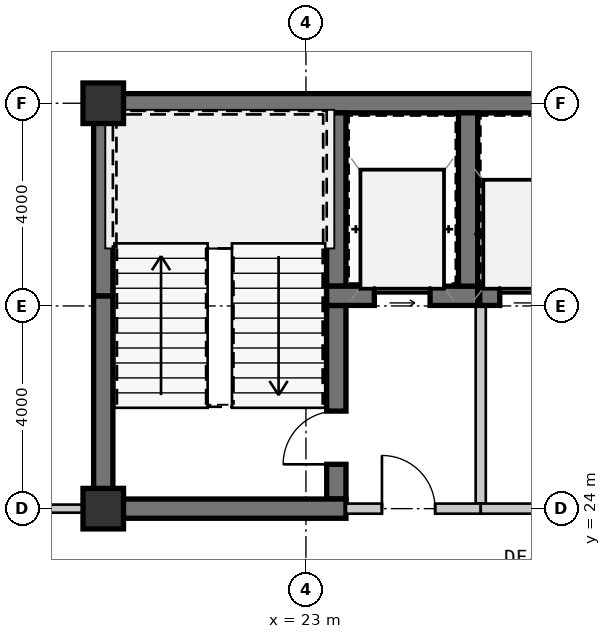
"""IFC4 building model, lengths in metres.
Left out: names, types, materials, properties, quantities, classifications, styles, units other than length and angle.
Written with IfcOpenShell. Run it as: python <this file> out.ifc"""

import sys

from ifc_helpers import new_model, si_unit, direction, frame, frame_2d, origin, origin_2d, place, context, subcontext, project, spatial, rectangle, extrude, source, transform, mapped, element, fill, save


model = new_model("IFC4")
c1 = context("Model", 3, precision=1e-05, world=origin(), true_north=direction((0.0, 1.0)))
c2 = subcontext(c1, "Body", "Model", "MODEL_VIEW")
j1 = project(units=[si_unit("LENGTHUNIT", "METRE"), si_unit("PLANEANGLEUNIT", "RADIAN")], contexts=[c1])
p1 = place(None, origin())
s1 = spatial("IfcSite", under=j1, at=p1, CompositionType="ELEMENT")
p2 = place(p1, origin())
s2 = spatial("IfcBuilding", under=s1, at=p2, CompositionType="ELEMENT")
p3 = place(p2, frame((0.0, 0.0, 32.55)))
s3 = spatial("IfcBuildingStorey", under=s2, at=p3, CompositionType="ELEMENT", Elevation=32.55)
m1 = source(origin(), c2, "Body", "SweptSolid", [
    extrude(rectangle(XDim=0.8, YDim=0.8, at=origin_2d()), origin(), (0.0, 0.0, 1.0), 3.15),
])
for number, where, z_axis, x_axis in (
    (1, (19.0, 24.0, 0.0), (0.0, 0.0, 1.0), (1.0, 0.0, 0.0)),
    (2, (19.0, 32.0, 0.0), (0.0, 0.0, 1.0), (1.0, 0.0, 0.0)),
):
    element("IfcColumn", number, at=place(p3, frame(where, z_axis=z_axis, x_axis=x_axis)), inside=s3, PredefinedType="COLUMN", context=c2, shape_type="MappedRepresentation", body=[
        mapped(m1, transform((0.0, 0.0, 0.0), scale=1.0)),
    ])
m2 = source(origin(), c2, "Body", "SweptSolid", [
    extrude(rectangle(XDim=9.19, YDim=0.38, at=frame_2d((4.595, 0.0))), origin(), (0.0, 0.0, 1.0), 2.93),
])
p4 = place(p3, frame((18.81, 32.0, 0.0), z_axis=(0.0, 0.0, 1.0), x_axis=(1.0, 0.0, 0.0)))
e3 = element("IfcWall", 3, at=p4, inside=s3, PredefinedType="SHEAR", context=c2, shape_type="MappedRepresentation", body=[
    mapped(m2, transform((0.0, 0.0, 0.0), scale=1.0)),
])
m3 = source(origin(), c2, "Body", "SweptSolid", [
    extrude(rectangle(XDim=4.01, YDim=0.38, at=frame_2d((2.005, 0.0))), origin(), (0.0, 0.0, 1.0), 2.93),
])
p5 = place(p3, frame((19.0, 24.19, 0.0), z_axis=(0.0, 0.0, 1.0), x_axis=(0.0, 1.0, 0.0)))
e4 = element("IfcWall", 4, at=p5, inside=s3, PredefinedType="SHEAR", context=c2, shape_type="MappedRepresentation", body=[
    mapped(m3, transform((0.0, 0.0, 0.0), scale=1.0)),
])
m4 = source(origin(), c2, "Body", "SweptSolid", [
    extrude(rectangle(XDim=3.61, YDim=0.38, at=frame_2d((1.805, 0.0))), origin(), (0.0, 0.0, 1.0), 2.93),
])
p6 = place(p3, frame((19.0, 28.2, 0.0), z_axis=(0.0, 0.0, 1.0), x_axis=(0.0, 1.0, 0.0)))
e5 = element("IfcWall", 5, at=p6, inside=s3, PredefinedType="SHEAR", context=c2, shape_type="MappedRepresentation", body=[
    mapped(m4, transform((0.0, 0.0, 0.0), scale=1.0)),
])
m5 = source(origin(), c2, "Body", "SweptSolid", [
    extrude(rectangle(XDim=3.42, YDim=0.38, at=frame_2d((1.71, 0.0))), origin(), (0.0, 0.0, 1.0), 2.93),
])
p7 = place(p3, frame((23.6, 28.39, 0.0), z_axis=(0.0, 0.0, 1.0), x_axis=(0.0, 1.0, 0.0)))
e6 = element("IfcWall", 6, at=p7, inside=s3, PredefinedType="SHEAR", context=c2, shape_type="MappedRepresentation", body=[
    mapped(m5, transform((0.0, 0.0, 0.0), scale=1.0)),
])
m6 = source(origin(), c2, "Body", "SweptSolid", [
    extrude(rectangle(XDim=3.82, YDim=0.38, at=frame_2d((1.91, 0.0))), origin(), (0.0, 0.0, 1.0), 2.93),
])
p8 = place(p3, frame((23.6, 24.19, 0.0), z_axis=(0.0, 0.0, 1.0), x_axis=(0.0, 1.0, 0.0)))
e7 = element("IfcWall", 7, at=p8, inside=s3, PredefinedType="SHEAR", context=c2, shape_type="MappedRepresentation", body=[
    mapped(m6, transform((0.0, 0.0, 0.0), scale=1.0)),
])
m7 = source(origin(), c2, "Body", "SweptSolid", [
    extrude(rectangle(XDim=1.05, YDim=2.1, at=frame_2d((0.525, 1.05))), frame((0.0, 0.2, 0.0), z_axis=(0.0, -1.0, 0.0), x_axis=(1.0, 0.0, 0.0)), (0.0, 0.0, 1.0), 0.4),
])
p9 = place(p8, frame((0.685, 0.0, 0.0)))
e8 = element("IfcOpeningElement", 8, at=p9, cuts=e7, PredefinedType="OPENING", context=c2, shape_type="MappedRepresentation", body=[
    mapped(m7, transform((0.0, 0.0, 0.0), scale=1.0)),
])
m8 = source(origin(), c2, "Body", "SweptSolid", [
    extrude(rectangle(XDim=4.98, YDim=0.38, at=frame_2d((2.49, 0.0))), origin(), (0.0, 0.0, 1.0), 2.93),
])
p10 = place(p3, frame((18.81, 24.0, 0.0), z_axis=(0.0, 0.0, 1.0), x_axis=(1.0, 0.0, 0.0)))
e9 = element("IfcWall", 9, at=p10, inside=s3, PredefinedType="SHEAR", context=c2, shape_type="MappedRepresentation", body=[
    mapped(m8, transform((0.0, 0.0, 0.0), scale=1.0)),
])
m9 = source(origin(), c2, "Body", "SweptSolid", [
    extrude(rectangle(XDim=2.98, YDim=0.38, at=frame_2d((1.49, 0.0))), origin(), (0.0, 0.0, 1.0), 2.93),
])
p11 = place(p3, frame((23.41, 28.2, 0.0), z_axis=(0.0, 0.0, 1.0), x_axis=(1.0, 0.0, 0.0)))
e10 = element("IfcWall", 10, at=p11, inside=s3, PredefinedType="SHEAR", context=c2, shape_type="MappedRepresentation", body=[
    mapped(m9, transform((0.0, 0.0, 0.0), scale=1.0)),
])
m10 = source(origin(), c2, "Body", "SweptSolid", [
    extrude(rectangle(XDim=1.1, YDim=2.15, at=frame_2d((0.55, 1.075))), frame((0.0, 0.2, 0.0), z_axis=(0.0, -1.0, 0.0), x_axis=(1.0, 0.0, 0.0)), (0.0, 0.0, 1.0), 0.4),
])
p12 = place(p11, frame((0.94, 0.0, 0.0)))
e11 = element("IfcOpeningElement", 11, at=p12, cuts=e10, PredefinedType="OPENING", context=c2, shape_type="MappedRepresentation", body=[
    mapped(m10, transform((0.0, 0.0, 0.0), scale=1.0)),
])
p13 = place(p3, frame((26.2, 28.39, 0.0), z_axis=(0.0, 0.0, 1.0), x_axis=(0.0, 1.0, 0.0)))
e12 = element("IfcWall", 12, at=p13, inside=s3, PredefinedType="SHEAR", context=c2, shape_type="MappedRepresentation", body=[
    mapped(m5, transform((0.0, 0.0, 0.0), scale=1.0)),
])
m11 = source(origin(), c2, "Body", "SweptSolid", [
    extrude(rectangle(XDim=3.91, YDim=0.2, at=frame_2d((1.955, 0.0))), origin(), (0.0, 0.0, 1.0), 2.93),
])
p14 = place(p3, frame((26.45, 24.1, 0.0), z_axis=(0.0, 0.0, 1.0), x_axis=(0.0, 1.0, 0.0)))
e13 = element("IfcWall", 13, at=p14, inside=s3, PredefinedType="SOLIDWALL", context=c2, shape_type="MappedRepresentation", body=[
    mapped(m11, transform((0.0, 0.0, 0.0), scale=1.0)),
])
m12 = source(origin(), c2, "Body", "SweptSolid", [
    extrude(rectangle(XDim=2.66, YDim=0.2, at=frame_2d((1.33, 0.0))), origin(), (0.0, 0.0, 1.0), 2.47),
])
p15 = place(p3, frame((23.79, 24.0, 0.0), z_axis=(0.0, 0.0, 1.0), x_axis=(1.0, 0.0, 0.0)))
e14 = element("IfcWall", 14, at=p15, inside=s3, PredefinedType="SOLIDWALL", context=c2, shape_type="MappedRepresentation", body=[
    mapped(m12, transform((0.0, 0.0, 0.0), scale=1.0)),
])
m13 = source(origin(), c2, "Body", "SweptSolid", [
    extrude(rectangle(XDim=1.05, YDim=2.1, at=frame_2d((0.525, 1.05))), frame((0.0, 0.11, 0.0), z_axis=(0.0, -1.0, 0.0), x_axis=(1.0, 0.0, 0.0)), (0.0, 0.0, 1.0), 0.22),
])
p16 = place(p15, frame((0.71, 0.0, 0.0)))
e15 = element("IfcOpeningElement", 15, at=p16, cuts=e14, PredefinedType="OPENING", context=c2, shape_type="MappedRepresentation", body=[
    mapped(m13, transform((0.0, 0.0, 0.0), scale=1.0)),
])
m14 = source(origin(), c2, "Body", "SweptSolid", [
    extrude(rectangle(XDim=2.07, YDim=0.38, at=frame_2d((1.035, 0.0))), origin(), (0.0, 0.0, 1.0), 2.93),
])
p17 = place(p3, frame((26.43, 28.2, 0.0), z_axis=(0.0, 0.0, 1.0), x_axis=(1.0, 0.0, 0.0)))
e16 = element("IfcWall", 16, at=p17, inside=s3, PredefinedType="SHEAR", context=c2, shape_type="MappedRepresentation", body=[
    mapped(m14, transform((0.0, 0.0, 0.0), scale=1.0)),
])
m15 = source(origin(), c2, "Body", "SweptSolid", [
    extrude(rectangle(XDim=1.05, YDim=2.15, at=frame_2d((0.525, 1.075))), frame((0.0, 0.2, 0.0), z_axis=(0.0, -1.0, 0.0), x_axis=(1.0, 0.0, 0.0)), (0.0, 0.0, 1.0), 0.4),
])
p18 = place(p17, frame((0.395, 0.0, 0.0)))
e17 = element("IfcOpeningElement", 17, at=p18, cuts=e16, PredefinedType="OPENING", context=c2, shape_type="MappedRepresentation", body=[
    mapped(m15, transform((0.0, 0.0, 0.0), scale=1.0)),
])
m16 = source(origin(), c2, "Body", "SweptSolid", [
    extrude(rectangle(XDim=4.35, YDim=0.2, at=frame_2d((2.175, 0.0))), origin(), (0.0, 0.0, 1.0), 2.47),
])
p19 = place(p3, frame((30.8, 24.0, 0.0), z_axis=(0.0, 0.0, 1.0), x_axis=(-1.0, 0.0, 0.0)))
e18 = element("IfcWall", 18, at=p19, inside=s3, PredefinedType="SOLIDWALL", context=c2, shape_type="MappedRepresentation", body=[
    mapped(m16, transform((0.0, 0.0, 0.0), scale=1.0)),
])
p20 = place(p19, frame((0.75, 0.0, 0.0)))
e19 = element("IfcOpeningElement", 19, at=p20, cuts=e18, PredefinedType="OPENING", context=c2, shape_type="MappedRepresentation", body=[
    mapped(m13, transform((0.0, 0.0, 0.0), scale=1.0)),
])
m17 = source(origin(), c2, "Body", "SweptSolid", [
    extrude(rectangle(XDim=4.13, YDim=0.16, at=frame_2d((2.065, 0.0))), origin(), (0.0, 0.0, 1.0), 2.93),
])
p21 = place(p3, frame((14.68, 24.0, 0.0), z_axis=(0.0, 0.0, 1.0), x_axis=(1.0, 0.0, 0.0)))
e20 = element("IfcWall", 20, at=p21, inside=s3, PredefinedType="PARTITIONING", context=c2, shape_type="MappedRepresentation", body=[
    mapped(m17, transform((0.0, 0.0, 0.0), scale=1.0)),
])
m18 = source(origin(), c2, "Body", "SweptSolid", [
    extrude(rectangle(XDim=0.92, YDim=2.1, at=frame_2d((0.46, 1.05))), frame((0.0, 0.09, 0.0), z_axis=(0.0, -1.0, 0.0), x_axis=(1.0, 0.0, 0.0)), (0.0, 0.0, 1.0), 0.18),
])
p22 = place(p21, frame((1.69, 0.0, 0.0)))
e21 = element("IfcOpeningElement", 21, at=p22, cuts=e20, PredefinedType="OPENING", context=c2, shape_type="MappedRepresentation", body=[
    mapped(m18, transform((0.0, 0.0, 0.0), scale=1.0)),
])
m19 = source(origin(), c2, "Body", "SweptSolid", [
    extrude(rectangle(XDim=1.05, YDim=2.1, at=frame_2d((0.525, 1.05))), frame((0.0, 0.025, 0.0), z_axis=(0.0, -1.0, 0.0), x_axis=(1.0, 0.0, 0.0)), (0.0, 0.0, 1.0), 0.05),
])
p23 = place(p9, origin())
e22 = element("IfcDoor", 22, at=p23, inside=s3, OperationType="SINGLE_SWING_LEFT", PredefinedType="DOOR", context=c2, shape_type="MappedRepresentation", body=[
    mapped(m19, transform((0.0, 0.0, 0.0), scale=1.0)),
])
fill(e8, e22)
m20 = source(origin(), c2, "Body", "SweptSolid", [
    extrude(rectangle(XDim=1.1, YDim=2.15, at=frame_2d((0.55, 1.075))), frame((0.0, 0.025, 0.0), z_axis=(0.0, -1.0, 0.0), x_axis=(1.0, 0.0, 0.0)), (0.0, 0.0, 1.0), 0.05),
])
p24 = place(p12, origin())
e23 = element("IfcDoor", 23, at=p24, inside=s3, OperationType="SLIDING_TO_LEFT", PredefinedType="DOOR", context=c2, shape_type="MappedRepresentation", body=[
    mapped(m20, transform((0.0, 0.0, 0.0), scale=1.0)),
])
fill(e11, e23)
p25 = place(p16, origin())
e24 = element("IfcDoor", 24, at=p25, inside=s3, OperationType="SINGLE_SWING_LEFT", PredefinedType="DOOR", context=c2, shape_type="MappedRepresentation", body=[
    mapped(m19, transform((0.0, 0.0, 0.0), scale=1.0)),
])
fill(e15, e24)
m21 = source(origin(), c2, "Body", "SweptSolid", [
    extrude(rectangle(XDim=1.05, YDim=2.15, at=frame_2d((0.525, 1.075))), frame((0.0, 0.025, 0.0), z_axis=(0.0, -1.0, 0.0), x_axis=(1.0, 0.0, 0.0)), (0.0, 0.0, 1.0), 0.05),
])
p26 = place(p18, origin())
e25 = element("IfcDoor", 25, at=p26, inside=s3, OperationType="SLIDING_TO_LEFT", PredefinedType="DOOR", context=c2, shape_type="MappedRepresentation", body=[
    mapped(m21, transform((0.0, 0.0, 0.0), scale=1.0)),
])
fill(e17, e25)
save(model, sys.argv[1])
